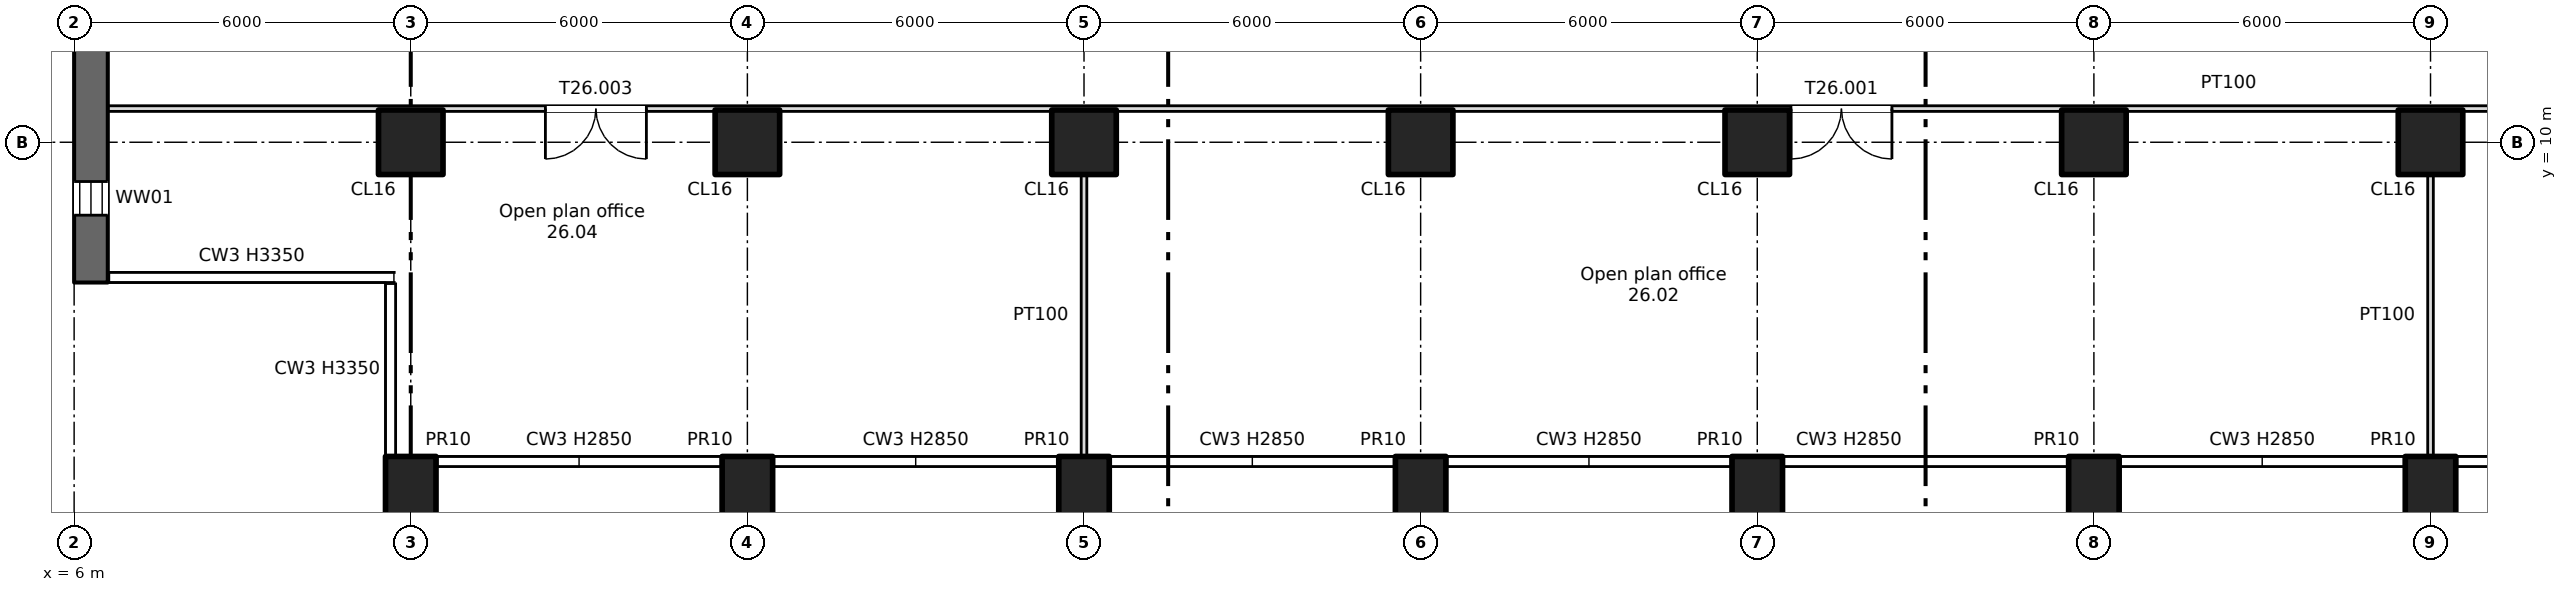
"""IFC4 building model, lengths in metres.
Left out: names, types, materials, properties, quantities, classifications, styles, units other than length and angle.
Written with IfcOpenShell. Run it as: python <this file> out.ifc"""

import sys

from ifc_helpers import new_model, si_unit, direction, frame, frame_2d, origin, origin_2d, place, context, subcontext, project, spatial, rectangle, extrude, element, fill, save


model = new_model("IFC4")
c1 = context("Model", 3, precision=1e-05, world=origin(), true_north=direction((0.0, 1.0)))
c2 = subcontext(c1, "Body", "Model", "MODEL_VIEW")
j1 = project(units=[si_unit("LENGTHUNIT", "METRE"), si_unit("PLANEANGLEUNIT", "RADIAN")], contexts=[c1])
p1 = place(None, origin())
s1 = spatial("IfcSite", under=j1, at=p1, CompositionType="ELEMENT")
p2 = place(p1, origin())
s2 = spatial("IfcBuilding", under=s1, at=p2, CompositionType="ELEMENT")
p3 = place(p2, frame((0.0, 0.0, 178.0)))
s3 = spatial("IfcBuildingStorey", under=s2, at=p3, CompositionType="ELEMENT", Elevation=178.0)
for number, where, z_axis, x_axis in (
    (1, (12.0, 3.7, -0.4), (0.0, 0.0, 1.0), (1.0, 0.0, 0.0)),
    (2, (18.0, 3.7, -0.4), (0.0, 0.0, 1.0), (1.0, 0.0, 0.0)),
    (3, (24.0, 3.7, -0.4), (0.0, 0.0, 1.0), (1.0, 0.0, 0.0)),
    (4, (30.0, 3.7, -0.4), (0.0, 0.0, 1.0), (1.0, 0.0, 0.0)),
    (5, (36.0, 3.7, -0.4), (0.0, 0.0, 1.0), (1.0, 0.0, 0.0)),
    (6, (42.0, 3.7, -0.4), (0.0, 0.0, 1.0), (1.0, 0.0, 0.0)),
    (7, (48.0, 3.7, -0.4), (0.0, 0.0, 1.0), (1.0, 0.0, 0.0)),
):
    element("IfcColumn", number, at=place(p3, frame(where, z_axis=z_axis, x_axis=x_axis)), inside=s3, PredefinedType="COLUMN", context=c2, shape_type="SweptSolid", body=[
        extrude(rectangle(XDim=0.9, YDim=1.4, at=origin_2d()), origin(), (0.0, 0.0, 1.0), 3.75),
    ])
for number, where, z_axis, x_axis in (
    (8, (12.0, 10.0, 0.0), (0.0, 0.0, 1.0), (1.0, 0.0, 0.0)),
    (9, (18.0, 10.0, 0.0), (0.0, 0.0, 1.0), (1.0, 0.0, 0.0)),
    (10, (24.0, 10.0, 0.0), (0.0, 0.0, 1.0), (1.0, 0.0, 0.0)),
    (11, (30.0, 10.0, 0.0), (0.0, 0.0, 1.0), (1.0, 0.0, 0.0)),
    (12, (36.0, 10.0, 0.0), (0.0, 0.0, 1.0), (1.0, 0.0, 0.0)),
    (13, (42.0, 10.0, 0.0), (0.0, 0.0, 1.0), (1.0, 0.0, 0.0)),
    (14, (48.0, 10.0, 0.0), (0.0, 0.0, 1.0), (1.0, 0.0, 0.0)),
):
    element("IfcColumn", number, at=place(p3, frame(where, z_axis=z_axis, x_axis=x_axis)), inside=s3, PredefinedType="COLUMN", context=c2, shape_type="SweptSolid", body=[
        extrude(rectangle(XDim=1.15, YDim=1.15, at=origin_2d()), origin(), (0.0, 0.0, 1.0), 3.35),
    ])
p4 = place(p3, frame((6.3, 7.5, 0.0), z_axis=(0.0, 0.0, 1.0), x_axis=(0.0, 1.0, 0.0)))
e15 = element("IfcWall", 15, at=p4, inside=s3, PredefinedType="SHEAR", context=c2, shape_type="SweptSolid", body=[
    extrude(rectangle(XDim=34.0, YDim=0.6, at=frame_2d((17.0, 0.0))), origin(), (0.0, 0.0, 1.0), 3.35),
])
p5 = place(p4, frame((1.2, 0.0, 0.6)))
e16 = element("IfcOpeningElement", 16, at=p5, cuts=e15, PredefinedType="OPENING", context=c2, shape_type="SweptSolid", body=[
    extrude(rectangle(XDim=0.6, YDim=2.4, at=frame_2d((0.3, 1.2))), frame((0.0, 0.31, 0.0), z_axis=(0.0, -1.0, 0.0), x_axis=(1.0, 0.0, 0.0)), (0.0, 0.0, 1.0), 0.62),
])
p6 = place(p4, frame((7.2, 0.0, 0.6)))
e17 = element("IfcOpeningElement", 17, at=p6, cuts=e15, PredefinedType="OPENING", context=c2, shape_type="SweptSolid", body=[
    extrude(rectangle(XDim=0.6, YDim=2.4, at=frame_2d((0.3, 1.2))), frame((0.0, 0.31, 0.0), z_axis=(0.0, -1.0, 0.0), x_axis=(1.0, 0.0, 0.0)), (0.0, 0.0, 1.0), 0.62),
])
p7 = place(p4, frame((13.2, 0.0, 0.6)))
e18 = element("IfcOpeningElement", 18, at=p7, cuts=e15, PredefinedType="OPENING", context=c2, shape_type="SweptSolid", body=[
    extrude(rectangle(XDim=0.6, YDim=2.4, at=frame_2d((0.3, 1.2))), frame((0.0, 0.31, 0.0), z_axis=(0.0, -1.0, 0.0), x_axis=(1.0, 0.0, 0.0)), (0.0, 0.0, 1.0), 0.62),
])
p8 = place(p4, frame((19.2, 0.0, 0.6)))
e19 = element("IfcOpeningElement", 19, at=p8, cuts=e15, PredefinedType="OPENING", context=c2, shape_type="SweptSolid", body=[
    extrude(rectangle(XDim=0.6, YDim=2.4, at=frame_2d((0.3, 1.2))), frame((0.0, 0.31, 0.0), z_axis=(0.0, -1.0, 0.0), x_axis=(1.0, 0.0, 0.0)), (0.0, 0.0, 1.0), 0.62),
])
p9 = place(p3, frame((6.6, 10.6, 0.0), z_axis=(0.0, 0.0, 1.0), x_axis=(1.0, 0.0, 0.0)))
e20 = element("IfcWall", 20, at=p9, inside=s3, PredefinedType="PARTITIONING", context=c2, shape_type="SweptSolid", body=[
    extrude(rectangle(XDim=64.8, YDim=0.1, at=frame_2d((32.4, 0.0))), origin(), (0.0, 0.0, 1.0), 3.35),
])
p10 = place(p9, frame((30.0, 0.0, 0.0)))
e21 = element("IfcOpeningElement", 21, at=p10, cuts=e20, PredefinedType="OPENING", context=c2, shape_type="SweptSolid", body=[
    extrude(rectangle(XDim=1.8, YDim=2.1, at=frame_2d((0.9, 1.05))), frame((0.0, 0.06, 0.0), z_axis=(0.0, -1.0, 0.0), x_axis=(1.0, 0.0, 0.0)), (0.0, 0.0, 1.0), 0.12),
])
p11 = place(p9, frame((50.95, 0.0, 0.0)))
e22 = element("IfcOpeningElement", 22, at=p11, cuts=e20, PredefinedType="OPENING", context=c2, shape_type="SweptSolid", body=[
    extrude(rectangle(XDim=1.8, YDim=2.1, at=frame_2d((0.9, 1.05))), frame((0.0, 0.06, 0.0), z_axis=(0.0, -1.0, 0.0), x_axis=(1.0, 0.0, 0.0)), (0.0, 0.0, 1.0), 0.12),
])
p12 = place(p9, frame((7.8, 0.0, 0.0)))
e23 = element("IfcOpeningElement", 23, at=p12, cuts=e20, PredefinedType="OPENING", context=c2, shape_type="SweptSolid", body=[
    extrude(rectangle(XDim=1.8, YDim=2.1, at=frame_2d((0.9, 1.05))), frame((0.0, 0.06, 0.0), z_axis=(0.0, -1.0, 0.0), x_axis=(1.0, 0.0, 0.0)), (0.0, 0.0, 1.0), 0.12),
])
for number, where, z_axis, x_axis in (
    (24, (24.0, 4.4, 0.0), (0.0, 0.0, 1.0), (0.0, 1.0, 0.0)),
    (25, (48.0, 4.4, 0.0), (0.0, 0.0, 1.0), (0.0, 1.0, 0.0)),
):
    element("IfcWall", number, at=place(p3, frame(where, z_axis=z_axis, x_axis=x_axis)), inside=s3, PredefinedType="PARTITIONING", context=c2, shape_type="SweptSolid", body=[
        extrude(rectangle(XDim=5.025, YDim=0.1, at=frame_2d((2.513, 0.0))), origin(), (0.0, 0.0, 1.0), 3.35),
    ])
p13 = place(p5, origin())
e26 = element("IfcWindow", 26, at=p13, inside=s3, PartitioningType="SINGLE_PANEL", PredefinedType="WINDOW", context=c2, shape_type="SweptSolid", body=[
    extrude(rectangle(XDim=0.6, YDim=2.4, at=frame_2d((0.3, 1.2))), frame((0.0, 0.03, 0.0), z_axis=(0.0, -1.0, 0.0), x_axis=(1.0, 0.0, 0.0)), (0.0, 0.0, 1.0), 0.06),
])
fill(e16, e26)
p14 = place(p10, origin())
e27 = element("IfcDoor", 27, at=p14, inside=s3, OperationType="DOUBLE_DOOR_SINGLE_SWING", PredefinedType="DOOR", context=c2, shape_type="SweptSolid", body=[
    extrude(rectangle(XDim=1.8, YDim=2.1, at=frame_2d((0.9, 1.05))), frame((0.0, 0.025, 0.0), z_axis=(0.0, -1.0, 0.0), x_axis=(1.0, 0.0, 0.0)), (0.0, 0.0, 1.0), 0.05),
])
fill(e21, e27)
p15 = place(p12, origin())
e28 = element("IfcDoor", 28, at=p15, inside=s3, OperationType="DOUBLE_DOOR_SINGLE_SWING", PredefinedType="DOOR", context=c2, shape_type="SweptSolid", body=[
    extrude(rectangle(XDim=1.8, YDim=2.1, at=frame_2d((0.9, 1.05))), frame((0.0, 0.025, 0.0), z_axis=(0.0, -1.0, 0.0), x_axis=(1.0, 0.0, 0.0)), (0.0, 0.0, 1.0), 0.05),
])
fill(e23, e28)
save(model, sys.argv[1])
